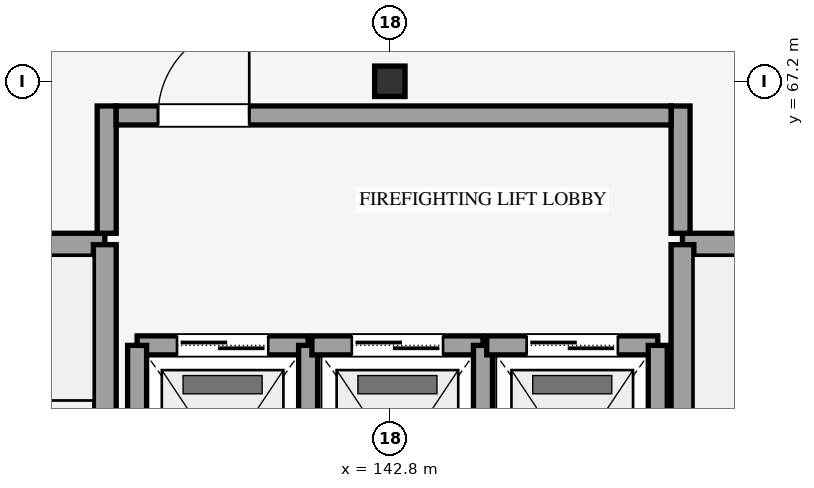
"""IFC4 building model, lengths in metres.
Left out: names, types, materials, properties, quantities, classifications, styles, units other than length and angle.
Written with IfcOpenShell. Run it as: python <this file> out.ifc"""

import sys

from ifc_helpers import new_model, si_unit, direction, frame, frame_2d, origin, origin_2d, place, context, subcontext, project, spatial, rectangle, i_section, extrude, element, fill, save


model = new_model("IFC4")
c1 = context("Model", 3, precision=1e-05, world=origin(), true_north=direction((0.0, 1.0)))
c2 = subcontext(c1, "Body", "Model", "MODEL_VIEW")
j1 = project(units=[si_unit("LENGTHUNIT", "METRE"), si_unit("PLANEANGLEUNIT", "RADIAN")], contexts=[c1])
p1 = place(None, origin())
s1 = spatial("IfcSite", under=j1, at=p1, CompositionType="ELEMENT")
p2 = place(p1, origin())
s2 = spatial("IfcBuilding", under=s1, at=p2, CompositionType="ELEMENT")
p3 = place(p2, frame((0.0, 0.0, 27.9)))
s3 = spatial("IfcBuildingStorey", under=s2, at=p3, CompositionType="ELEMENT", Elevation=27.9)
p4 = place(p3, frame((142.8, 67.2, 0.0), z_axis=(0.0, 0.0, 1.0), x_axis=(1.0, 0.0, 0.0)))
e1 = element("IfcColumn", 1, at=p4, inside=s3, PredefinedType="COLUMN", context=c2, shape_type="SweptSolid", body=[
    extrude(i_section(OverallWidth=0.4, OverallDepth=0.4, WebThickness=0.013, FlangeThickness=0.021, FilletRadius=0.022, at=origin_2d()), origin(), (0.0, 0.0, 1.0), 4.2),
])
p5 = place(p3, frame((135.05, 65.05, 0.0), z_axis=(0.0, 0.0, 1.0), x_axis=(1.0, 0.0, 0.0)))
e2 = element("IfcWall", 2, at=p5, inside=s3, PredefinedType="SHEAR", context=c2, shape_type="SweptSolid", body=[
    extrude(rectangle(XDim=4.0, YDim=0.3, at=frame_2d((2.0, 0.0))), origin(), (0.0, 0.0, 1.0), 4.2),
])
p6 = place(p3, frame((139.05, 50.75, 0.0), z_axis=(0.0, 0.0, 1.0), x_axis=(0.0, 1.0, 0.0)))
e3 = element("IfcWall", 3, at=p6, inside=s3, PredefinedType="SHEAR", context=c2, shape_type="SweptSolid", body=[
    extrude(rectangle(XDim=14.3, YDim=0.3, at=frame_2d((7.15, 0.0))), origin(), (0.0, 0.0, 1.0), 4.2),
])
p7 = place(p3, frame((146.65, 65.05, 0.0), z_axis=(0.0, 0.0, 1.0), x_axis=(1.0, 0.0, 0.0)))
e4 = element("IfcWall", 4, at=p7, inside=s3, PredefinedType="SHEAR", context=c2, shape_type="SweptSolid", body=[
    extrude(rectangle(XDim=4.0, YDim=0.3, at=frame_2d((2.0, 0.0))), origin(), (0.0, 0.0, 1.0), 4.2),
])
p8 = place(p3, frame((146.65, 50.75, 0.0), z_axis=(0.0, 0.0, 1.0), x_axis=(0.0, 1.0, 0.0)))
e5 = element("IfcWall", 5, at=p8, inside=s3, PredefinedType="SHEAR", context=c2, shape_type="SweptSolid", body=[
    extrude(rectangle(XDim=14.3, YDim=0.3, at=frame_2d((7.15, 0.0))), origin(), (0.0, 0.0, 1.0), 4.2),
])
p9 = place(p3, frame((139.475, 63.725, 0.0), z_axis=(0.0, 0.0, 1.0), x_axis=(1.0, 0.0, 0.0)))
e6 = element("IfcWall", 6, at=p9, inside=s3, PredefinedType="SHEAR", context=c2, shape_type="SweptSolid", body=[
    extrude(rectangle(XDim=2.25, YDim=0.25, at=frame_2d((1.125, 0.0))), origin(), (0.0, 0.0, 1.0), 3.96),
])
p10 = place(p9, frame((0.525, 0.0, 0.0)))
e7 = element("IfcOpeningElement", 7, at=p10, cuts=e6, PredefinedType="OPENING", context=c2, shape_type="SweptSolid", body=[
    extrude(rectangle(XDim=1.2, YDim=2.18, at=frame_2d((0.6, 1.09))), frame((0.0, 0.135, 0.0), z_axis=(0.0, -1.0, 0.0), x_axis=(1.0, 0.0, 0.0)), (0.0, 0.0, 1.0), 0.27),
])
for number, where, z_axis, x_axis in (
    (8, (139.475, 60.675, 0.0), (0.0, 0.0, 1.0), (0.0, 1.0, 0.0)),
    (9, (141.725, 60.675, 0.0), (0.0, 0.0, 1.0), (0.0, 1.0, 0.0)),
):
    element("IfcWall", number, at=place(p3, frame(where, z_axis=z_axis, x_axis=x_axis)), inside=s3, PredefinedType="SHEAR", context=c2, shape_type="SweptSolid", body=[
        extrude(rectangle(XDim=3.05, YDim=0.25, at=frame_2d((1.525, 0.0))), origin(), (0.0, 0.0, 1.0), 3.96),
    ])
p11 = place(p3, frame((141.775, 63.725, 0.0), z_axis=(0.0, 0.0, 1.0), x_axis=(1.0, 0.0, 0.0)))
e10 = element("IfcWall", 10, at=p11, inside=s3, PredefinedType="SHEAR", context=c2, shape_type="SweptSolid", body=[
    extrude(rectangle(XDim=2.25, YDim=0.25, at=frame_2d((1.125, 0.0))), origin(), (0.0, 0.0, 1.0), 3.96),
])
p12 = place(p11, frame((0.525, 0.0, 0.0)))
e11 = element("IfcOpeningElement", 11, at=p12, cuts=e10, PredefinedType="OPENING", context=c2, shape_type="SweptSolid", body=[
    extrude(rectangle(XDim=1.2, YDim=2.18, at=frame_2d((0.6, 1.09))), frame((0.0, 0.135, 0.0), z_axis=(0.0, -1.0, 0.0), x_axis=(1.0, 0.0, 0.0)), (0.0, 0.0, 1.0), 0.27),
])
p13 = place(p3, frame((144.025, 60.675, 0.0), z_axis=(0.0, 0.0, 1.0), x_axis=(0.0, 1.0, 0.0)))
e12 = element("IfcWall", 12, at=p13, inside=s3, PredefinedType="SHEAR", context=c2, shape_type="SweptSolid", body=[
    extrude(rectangle(XDim=3.05, YDim=0.25, at=frame_2d((1.525, 0.0))), origin(), (0.0, 0.0, 1.0), 3.96),
])
p14 = place(p3, frame((144.075, 63.725, 0.0), z_axis=(0.0, 0.0, 1.0), x_axis=(1.0, 0.0, 0.0)))
e13 = element("IfcWall", 13, at=p14, inside=s3, PredefinedType="SHEAR", context=c2, shape_type="SweptSolid", body=[
    extrude(rectangle(XDim=2.25, YDim=0.25, at=frame_2d((1.125, 0.0))), origin(), (0.0, 0.0, 1.0), 3.96),
])
p15 = place(p14, frame((0.525, 0.0, 0.0)))
e14 = element("IfcOpeningElement", 14, at=p15, cuts=e13, PredefinedType="OPENING", context=c2, shape_type="SweptSolid", body=[
    extrude(rectangle(XDim=1.2, YDim=2.18, at=frame_2d((0.6, 1.09))), frame((0.0, 0.135, 0.0), z_axis=(0.0, -1.0, 0.0), x_axis=(1.0, 0.0, 0.0)), (0.0, 0.0, 1.0), 0.27),
])
p16 = place(p3, frame((146.325, 60.675, 0.0), z_axis=(0.0, 0.0, 1.0), x_axis=(0.0, 1.0, 0.0)))
e15 = element("IfcWall", 15, at=p16, inside=s3, PredefinedType="SHEAR", context=c2, shape_type="SweptSolid", body=[
    extrude(rectangle(XDim=3.05, YDim=0.25, at=frame_2d((1.525, 0.0))), origin(), (0.0, 0.0, 1.0), 3.96),
])
for number, where, z_axis, x_axis in (
    (16, (139.075, 65.2, 0.0), (0.0, 0.0, 1.0), (0.0, 1.0, 0.0)),
    (17, (146.625, 65.2, 0.0), (0.0, 0.0, 1.0), (0.0, 1.0, 0.0)),
):
    element("IfcWall", number, at=place(p3, frame(where, z_axis=z_axis, x_axis=x_axis)), inside=s3, PredefinedType="SHEAR", context=c2, shape_type="SweptSolid", body=[
        extrude(rectangle(XDim=1.675, YDim=0.25, at=frame_2d((0.837, 0.0))), origin(), (0.0, 0.0, 1.0), 3.96),
    ])
p17 = place(p3, frame((139.2, 66.75, 0.0), z_axis=(0.0, 0.0, 1.0), x_axis=(1.0, 0.0, 0.0)))
e18 = element("IfcWall", 18, at=p17, inside=s3, PredefinedType="SHEAR", context=c2, shape_type="SweptSolid", body=[
    extrude(rectangle(XDim=7.3, YDim=0.25, at=frame_2d((3.65, 0.0))), origin(), (0.0, 0.0, 1.0), 3.96),
])
p18 = place(p17, frame((0.55, 0.0, 0.0)))
e19 = element("IfcOpeningElement", 19, at=p18, cuts=e18, PredefinedType="OPENING", context=c2, shape_type="SweptSolid", body=[
    extrude(rectangle(XDim=1.2, YDim=2.15, at=frame_2d((0.6, 1.075))), frame((0.0, 0.135, 0.0), z_axis=(0.0, -1.0, 0.0), x_axis=(1.0, 0.0, 0.0)), (0.0, 0.0, 1.0), 0.27),
])
p19 = place(p10, origin())
e20 = element("IfcDoor", 20, at=p19, inside=s3, OperationType="DOUBLE_DOOR_SLIDING", PredefinedType="DOOR", context=c2, shape_type="SweptSolid", body=[
    extrude(rectangle(XDim=1.2, YDim=2.18, at=frame_2d((0.6, 1.09))), frame((0.0, 0.025, 0.0), z_axis=(0.0, -1.0, 0.0), x_axis=(1.0, 0.0, 0.0)), (0.0, 0.0, 1.0), 0.05),
])
fill(e7, e20)
p20 = place(p12, origin())
e21 = element("IfcDoor", 21, at=p20, inside=s3, OperationType="DOUBLE_DOOR_SLIDING", PredefinedType="DOOR", context=c2, shape_type="SweptSolid", body=[
    extrude(rectangle(XDim=1.2, YDim=2.18, at=frame_2d((0.6, 1.09))), frame((0.0, 0.025, 0.0), z_axis=(0.0, -1.0, 0.0), x_axis=(1.0, 0.0, 0.0)), (0.0, 0.0, 1.0), 0.05),
])
fill(e11, e21)
p21 = place(p15, origin())
e22 = element("IfcDoor", 22, at=p21, inside=s3, OperationType="DOUBLE_DOOR_SLIDING", PredefinedType="DOOR", context=c2, shape_type="SweptSolid", body=[
    extrude(rectangle(XDim=1.2, YDim=2.18, at=frame_2d((0.6, 1.09))), frame((0.0, 0.025, 0.0), z_axis=(0.0, -1.0, 0.0), x_axis=(1.0, 0.0, 0.0)), (0.0, 0.0, 1.0), 0.05),
])
fill(e14, e22)
p22 = place(p18, origin())
e23 = element("IfcDoor", 23, at=p22, inside=s3, OperationType="SINGLE_SWING_RIGHT", PredefinedType="DOOR", context=c2, shape_type="SweptSolid", body=[
    extrude(rectangle(XDim=1.2, YDim=2.15, at=frame_2d((0.6, 1.075))), frame((0.0, 0.025, 0.0), z_axis=(0.0, -1.0, 0.0), x_axis=(1.0, 0.0, 0.0)), (0.0, 0.0, 1.0), 0.05),
])
fill(e19, e23)
save(model, sys.argv[1])
